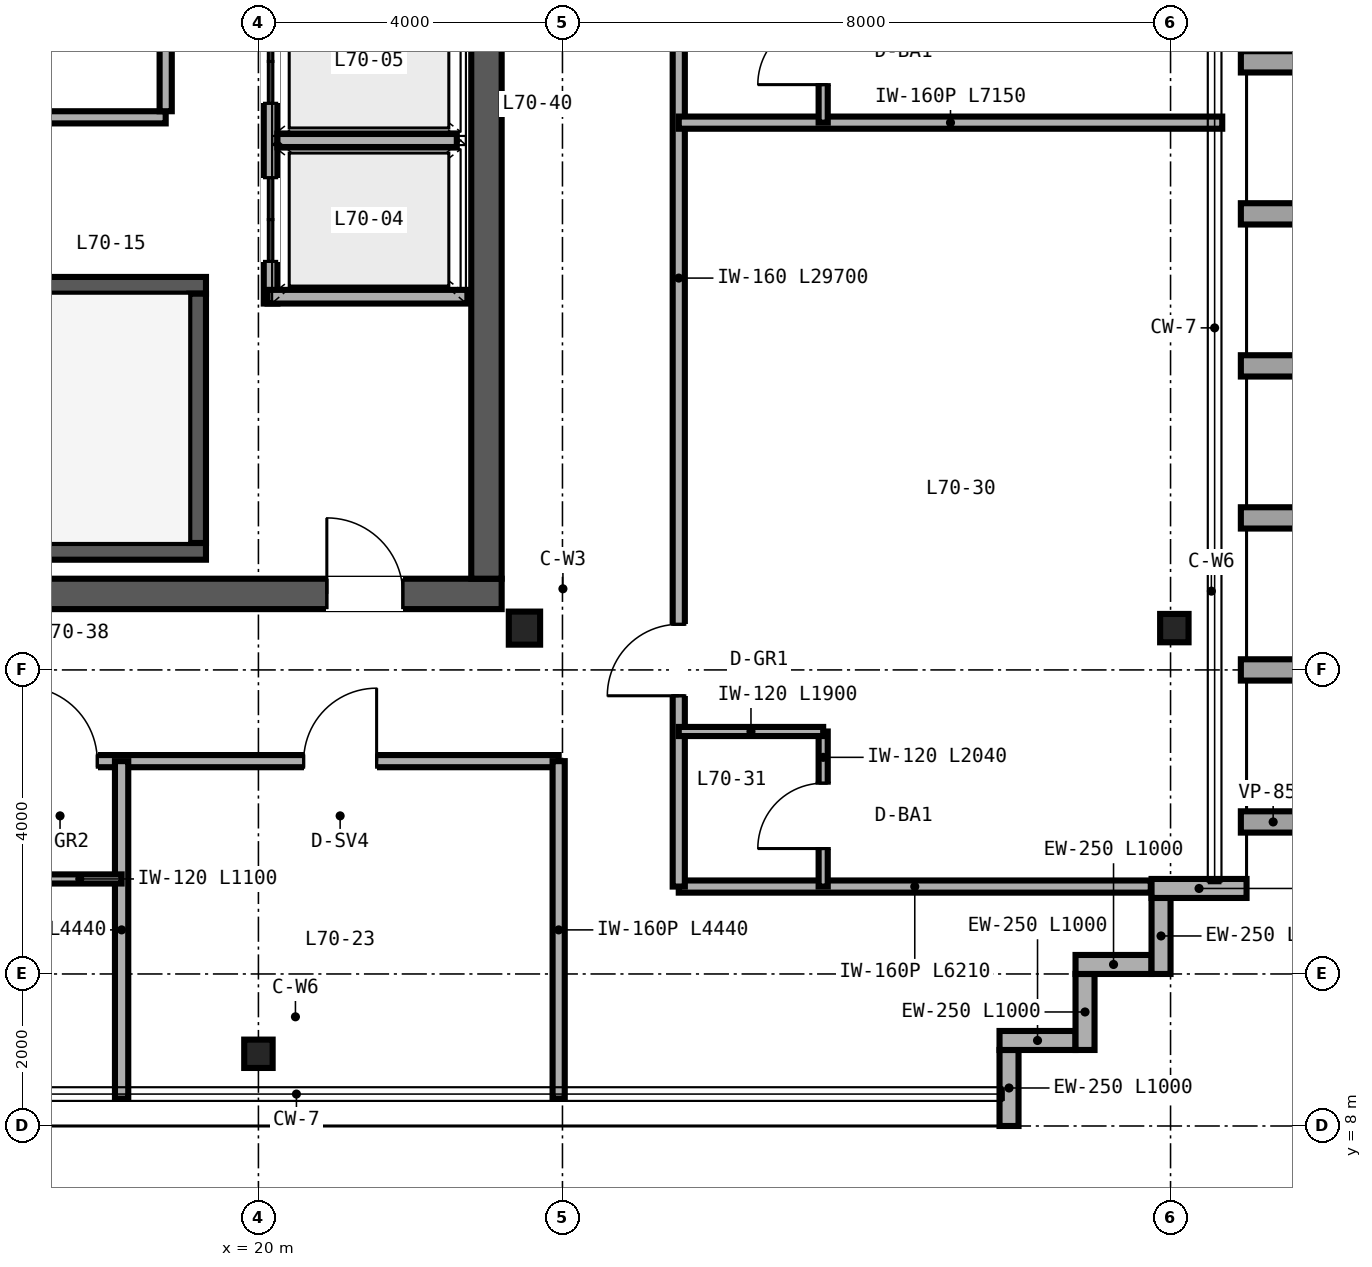
"""IFC4 building model, lengths in metres.
Left out: names, types, materials, properties, quantities, classifications, styles, units other than length and angle.
Written with IfcOpenShell. Run it as: python <this file> out.ifc"""

import sys

from ifc_helpers import new_model, si_unit, direction, frame, frame_2d, origin, origin_2d, place, context, subcontext, project, spatial, rectangle, i_section, extrude, source, transform, mapped, element, fill, save


model = new_model("IFC4")
c1 = context("Model", 3, precision=1e-05, world=origin(), true_north=direction((0.0, 1.0)))
c2 = subcontext(c1, "Body", "Model", "MODEL_VIEW")
j1 = project(units=[si_unit("LENGTHUNIT", "METRE"), si_unit("PLANEANGLEUNIT", "RADIAN")], contexts=[c1])
p1 = place(None, origin())
s1 = spatial("IfcSite", under=j1, at=p1, CompositionType="ELEMENT")
p2 = place(p1, origin())
s2 = spatial("IfcBuilding", under=s1, at=p2, CompositionType="ELEMENT")
p3 = place(p2, frame((0.0, 0.0, 276.0)))
s3 = spatial("IfcBuildingStorey", under=s2, at=p3, CompositionType="ELEMENT", Elevation=276.0)
p4 = place(p3, frame((10.8, 15.0, 0.0), z_axis=(0.0, 0.0, 1.0), x_axis=(1.0, 0.0, 0.0)))
e1 = element("IfcWall", 1, at=p4, inside=s3, PredefinedType="SHEAR", context=c2, shape_type="SweptSolid", body=[
    extrude(rectangle(XDim=12.4, YDim=0.4, at=frame_2d((6.2, 0.0))), origin(), (0.0, 0.0, 1.0), 3.38),
])
p5 = place(p4, frame((10.1, 0.0, 0.0)))
e2 = element("IfcOpeningElement", 2, at=p5, cuts=e1, PredefinedType="OPENING", context=c2, shape_type="SweptSolid", body=[
    extrude(rectangle(XDim=1.0, YDim=2.15, at=frame_2d((0.5, 1.075))), frame((0.0, 0.21, 0.0), z_axis=(0.0, -1.0, 0.0), x_axis=(1.0, 0.0, 0.0)), (0.0, 0.0, 1.0), 0.42),
])
p6 = place(p3, frame((23.0, 15.2, 0.0), z_axis=(0.0, 0.0, 1.0), x_axis=(0.0, 1.0, 0.0)))
e3 = element("IfcWall", 3, at=p6, inside=s3, PredefinedType="SHEAR", context=c2, shape_type="SweptSolid", body=[
    extrude(rectangle(XDim=21.6, YDim=0.4, at=frame_2d((10.8, 0.0))), origin(), (0.0, 0.0, 1.0), 3.38),
])
p7 = place(p3, frame((11.2, 15.56, 0.0), z_axis=(0.0, 0.0, 1.0), x_axis=(1.0, 0.0, 0.0)))
e4 = element("IfcWall", 4, at=p7, inside=s3, PredefinedType="SHEAR", context=c2, shape_type="SweptSolid", body=[
    extrude(rectangle(XDim=8.11, YDim=0.22, at=frame_2d((4.055, 0.0))), origin(), (0.0, 0.0, 1.0), 3.4),
])
p8 = place(p3, frame((11.2, 19.06, 0.0), z_axis=(0.0, 0.0, 1.0), x_axis=(1.0, 0.0, 0.0)))
e5 = element("IfcWall", 5, at=p8, inside=s3, PredefinedType="SHEAR", context=c2, shape_type="SweptSolid", body=[
    extrude(rectangle(XDim=8.11, YDim=0.22, at=frame_2d((4.055, 0.0))), origin(), (0.0, 0.0, 1.0), 3.4),
])
p9 = place(p8, frame((0.72, 0.0, 0.0)))
e6 = element("IfcOpeningElement", 6, at=p9, cuts=e5, PredefinedType="OPENING", context=c2, shape_type="SweptSolid", body=[
    extrude(rectangle(XDim=1.05, YDim=2.15, at=frame_2d((0.525, 1.075))), frame((0.0, 0.12, 0.0), z_axis=(0.0, -1.0, 0.0), x_axis=(1.0, 0.0, 0.0)), (0.0, 0.0, 1.0), 0.24),
])
p10 = place(p3, frame((19.2, 15.67, 0.0), z_axis=(0.0, 0.0, 1.0), x_axis=(0.0, 1.0, 0.0)))
e7 = element("IfcWall", 7, at=p10, inside=s3, PredefinedType="SHEAR", context=c2, shape_type="SweptSolid", body=[
    extrude(rectangle(XDim=3.28, YDim=0.22, at=frame_2d((1.64, 0.0))), origin(), (0.0, 0.0, 1.0), 3.4),
])
m1 = source(origin(), c2, "Body", "SweptSolid", [
    extrude(i_section(OverallWidth=0.412, OverallDepth=0.435, WebThickness=0.036, FlangeThickness=0.057, FilletRadius=0.025, at=origin_2d()), origin(), (0.0, 0.0, 1.0), 3.38),
])
p11 = place(p3, frame((23.5, 14.55, 0.0), z_axis=(0.0, 0.0, 1.0), x_axis=(1.0, 0.0, 0.0)))
e8 = element("IfcColumn", 8, at=p11, inside=s3, PredefinedType="COLUMN", context=c2, shape_type="MappedRepresentation", body=[
    mapped(m1, transform((0.0, 0.0, 0.0), scale=1.0)),
])
m2 = source(origin(), c2, "Body", "SweptSolid", [
    extrude(i_section(OverallWidth=0.374, OverallDepth=0.373, WebThickness=0.016, FlangeThickness=0.026, FilletRadius=0.025, at=origin_2d()), origin(), (0.0, 0.0, 1.0), 3.38),
])
for number, where, z_axis, x_axis in (
    (9, (20.0, 8.95, 0.0), (0.0, 0.0, 1.0), (1.0, 0.0, 0.0)),
    (10, (32.05, 14.55, 0.0), (0.0, 0.0, 1.0), (1.0, 0.0, 0.0)),
):
    element("IfcColumn", number, at=place(p3, frame(where, z_axis=z_axis, x_axis=x_axis)), inside=s3, PredefinedType="COLUMN", context=c2, shape_type="MappedRepresentation", body=[
        mapped(m2, transform((0.0, 0.0, 0.0), scale=1.0)),
    ])
for number, where, z_axis, x_axis in (
    (11, (29.875, 8.0, 0.0), (0.0, 0.0, 1.0), (0.0, 1.0, 0.0)),
    (12, (29.75, 9.125, 0.0), (0.0, 0.0, 1.0), (1.0, 0.0, 0.0)),
    (13, (30.875, 9.0, 0.0), (0.0, 0.0, 1.0), (0.0, 1.0, 0.0)),
    (14, (30.75, 10.125, 0.0), (0.0, 0.0, 1.0), (1.0, 0.0, 0.0)),
    (15, (31.875, 10.0, 0.0), (0.0, 0.0, 1.0), (0.0, 1.0, 0.0)),
):
    element("IfcWall", number, at=place(p3, frame(where, z_axis=z_axis, x_axis=x_axis)), inside=s3, PredefinedType="SOLIDWALL", context=c2, shape_type="SweptSolid", body=[
        extrude(rectangle(XDim=1.0, YDim=0.25, at=frame_2d((0.5, 0.0))), origin(), (0.0, 0.0, 1.0), 3.38),
    ])
p12 = place(p3, frame((31.75, 11.125, 0.0), z_axis=(0.0, 0.0, 1.0), x_axis=(1.0, 0.0, 0.0)))
e16 = element("IfcWall", 16, at=p12, inside=s3, PredefinedType="SOLIDWALL", context=c2, shape_type="SweptSolid", body=[
    extrude(rectangle(XDim=1.25, YDim=0.25, at=frame_2d((0.625, 0.0))), origin(), (0.0, 0.0, 1.0), 3.38),
])
p13 = place(p3, frame((20.16, 18.82, 0.0), z_axis=(0.0, 0.0, 1.0), x_axis=(0.0, 1.0, 0.0)))
e17 = element("IfcWall", 17, at=p13, inside=s3, PredefinedType="SOLIDWALL", context=c2, shape_type="SweptSolid", body=[
    extrude(rectangle(XDim=6.32, YDim=0.18, at=frame_2d((3.16, 0.0))), origin(), (0.0, 0.0, 1.0), 2.48),
])
p14 = place(p13, frame((0.555, 0.0, 0.0)))
e18 = element("IfcOpeningElement", 18, at=p14, cuts=e17, PredefinedType="OPENING", context=c2, shape_type="SweptSolid", body=[
    extrude(rectangle(XDim=1.1, YDim=2.2, at=frame_2d((0.55, 1.1))), frame((0.0, 0.1, 0.0), z_axis=(0.0, -1.0, 0.0), x_axis=(1.0, 0.0, 0.0)), (0.0, 0.0, 1.0), 0.2),
])
p15 = place(p13, frame((2.635, 0.0, 0.0)))
e19 = element("IfcOpeningElement", 19, at=p15, cuts=e17, PredefinedType="OPENING", context=c2, shape_type="SweptSolid", body=[
    extrude(rectangle(XDim=1.1, YDim=2.2, at=frame_2d((0.55, 1.1))), frame((0.0, 0.1, 0.0), z_axis=(0.0, -1.0, 0.0), x_axis=(1.0, 0.0, 0.0)), (0.0, 0.0, 1.0), 0.2),
])
p16 = place(p13, frame((4.69, 0.0, 0.0)))
e20 = element("IfcOpeningElement", 20, at=p16, cuts=e17, PredefinedType="OPENING", context=c2, shape_type="SweptSolid", body=[
    extrude(rectangle(XDim=1.1, YDim=2.2, at=frame_2d((0.55, 1.1))), frame((0.0, 0.1, 0.0), z_axis=(0.0, -1.0, 0.0), x_axis=(1.0, 0.0, 0.0)), (0.0, 0.0, 1.0), 0.2),
])
p17 = place(p3, frame((20.12, 18.91, 0.0), z_axis=(0.0, 0.0, 1.0), x_axis=(1.0, 0.0, 0.0)))
e21 = element("IfcWall", 21, at=p17, inside=s3, PredefinedType="SOLIDWALL", context=c2, shape_type="SweptSolid", body=[
    extrude(rectangle(XDim=2.63, YDim=0.18, at=frame_2d((1.315, 0.0))), origin(), (0.0, 0.0, 1.0), 3.38),
])
p18 = place(p3, frame((20.25, 20.965, 0.0), z_axis=(0.0, 0.0, 1.0), x_axis=(1.0, 0.0, 0.0)))
e22 = element("IfcWall", 22, at=p18, inside=s3, PredefinedType="SOLIDWALL", context=c2, shape_type="SweptSolid", body=[
    extrude(rectangle(XDim=2.36, YDim=0.18, at=frame_2d((1.18, 0.0))), origin(), (0.0, 0.0, 1.0), 2.48),
])
p19 = place(p3, frame((14.2, 21.27, 0.0), z_axis=(0.0, 0.0, 1.0), x_axis=(1.0, 0.0, 0.0)))
e23 = element("IfcWall", 23, at=p19, inside=s3, PredefinedType="PARTITIONING", context=c2, shape_type="SweptSolid", body=[
    extrude(rectangle(XDim=4.58, YDim=0.16, at=frame_2d((2.29, 0.0))), origin(), (0.0, 0.0, 1.0), 3.38),
])
p20 = place(p19, frame((1.8, 0.0, 0.0)))
e24 = element("IfcOpeningElement", 24, at=p20, cuts=e23, PredefinedType="OPENING", context=c2, shape_type="SweptSolid", body=[
    extrude(rectangle(XDim=1.0, YDim=2.15, at=frame_2d((0.5, 1.075))), frame((0.0, 0.09, 0.0), z_axis=(0.0, -1.0, 0.0), x_axis=(1.0, 0.0, 0.0)), (0.0, 0.0, 1.0), 0.18),
])
p21 = place(p3, frame((18.78, 21.35, 0.0), z_axis=(0.0, 0.0, 1.0), x_axis=(0.0, 1.0, 0.0)))
e25 = element("IfcWall", 25, at=p21, inside=s3, PredefinedType="PARTITIONING", context=c2, shape_type="SweptSolid", body=[
    extrude(rectangle(XDim=3.81, YDim=0.16, at=frame_2d((1.905, 0.0))), origin(), (0.0, 0.0, 1.0), 3.38),
])
p22 = place(p3, frame((11.2, 12.8, 0.0), z_axis=(0.0, 0.0, 1.0), x_axis=(1.0, 0.0, 0.0)))
e26 = element("IfcWall", 26, at=p22, inside=s3, PredefinedType="PARTITIONING", context=c2, shape_type="SweptSolid", body=[
    extrude(rectangle(XDim=12.75, YDim=0.16, at=frame_2d((6.375, 0.0))), origin(), (0.0, 0.0, 1.0), 3.38),
])
p23 = place(p22, frame((5.7, 0.0, 0.0)))
e27 = element("IfcOpeningElement", 27, at=p23, cuts=e26, PredefinedType="OPENING", context=c2, shape_type="SweptSolid", body=[
    extrude(rectangle(XDim=0.98, YDim=2.2, at=frame_2d((0.49, 1.1))), frame((0.0, 0.09, 0.0), z_axis=(0.0, -1.0, 0.0), x_axis=(1.0, 0.0, 0.0)), (0.0, 0.0, 1.0), 0.18),
])
p24 = place(p22, frame((9.395, 0.0, 0.0)))
e28 = element("IfcOpeningElement", 28, at=p24, cuts=e26, PredefinedType="OPENING", context=c2, shape_type="SweptSolid", body=[
    extrude(rectangle(XDim=0.96, YDim=2.15, at=frame_2d((0.48, 1.075))), frame((0.0, 0.09, 0.0), z_axis=(0.0, -1.0, 0.0), x_axis=(1.0, 0.0, 0.0)), (0.0, 0.0, 1.0), 0.18),
])
p25 = place(p3, frame((23.95, 8.36, 0.0), z_axis=(0.0, 0.0, 1.0), x_axis=(0.0, 1.0, 0.0)))
e29 = element("IfcWall", 29, at=p25, inside=s3, PredefinedType="PARTITIONING", context=c2, shape_type="SweptSolid", body=[
    extrude(rectangle(XDim=4.44, YDim=0.16, at=frame_2d((2.22, 0.0))), origin(), (0.0, 0.0, 1.0), 3.38),
])
p26 = place(p3, frame((18.2, 8.36, 0.0), z_axis=(0.0, 0.0, 1.0), x_axis=(0.0, 1.0, 0.0)))
e30 = element("IfcWall", 30, at=p26, inside=s3, PredefinedType="PARTITIONING", context=c2, shape_type="SweptSolid", body=[
    extrude(rectangle(XDim=4.44, YDim=0.175, at=frame_2d((2.22, 0.0))), origin(), (0.0, 0.0, 1.0), 2.687),
])
p27 = place(p3, frame((17.1, 11.25, 0.0), z_axis=(0.0, 0.0, 1.0), x_axis=(1.0, 0.0, 0.0)))
e31 = element("IfcWall", 31, at=p27, inside=s3, PredefinedType="PARTITIONING", context=c2, shape_type="SweptSolid", body=[
    extrude(rectangle(XDim=1.1, YDim=0.12, at=frame_2d((0.55, 0.0))), origin(), (0.0, 0.0, 1.0), 3.38),
])
p28 = place(p3, frame((25.53, 11.15, 0.0), z_axis=(0.0, 0.0, 1.0), x_axis=(1.0, 0.0, 0.0)))
e32 = element("IfcWall", 32, at=p28, inside=s3, PredefinedType="PARTITIONING", context=c2, shape_type="SweptSolid", body=[
    extrude(rectangle(XDim=6.21, YDim=0.16, at=frame_2d((3.105, 0.0))), origin(), (0.0, 0.0, 1.0), 3.38),
])
p29 = place(p3, frame((25.53, 11.15, 0.0), z_axis=(0.0, 0.0, 1.0), x_axis=(0.0, 1.0, 0.0)))
e33 = element("IfcWall", 33, at=p29, inside=s3, PredefinedType="PARTITIONING", context=c2, shape_type="SweptSolid", body=[
    extrude(rectangle(XDim=29.7, YDim=0.16, at=frame_2d((14.85, 0.0))), origin(), (0.0, 0.0, 1.0), 2.524),
])
p30 = place(p29, frame((2.51, 0.0, 0.0)))
e34 = element("IfcOpeningElement", 34, at=p30, cuts=e33, PredefinedType="OPENING", context=c2, shape_type="SweptSolid", body=[
    extrude(rectangle(XDim=0.94, YDim=2.15, at=frame_2d((0.47, 1.075))), frame((0.0, 0.09, 0.0), z_axis=(0.0, -1.0, 0.0), x_axis=(1.0, 0.0, 0.0)), (0.0, 0.0, 1.0), 0.18),
])
p31 = place(p29, frame((12.56, 0.0, 0.0)))
e35 = element("IfcOpeningElement", 35, at=p31, cuts=e33, PredefinedType="OPENING", context=c2, shape_type="SweptSolid", body=[
    extrude(rectangle(XDim=0.94, YDim=2.15, at=frame_2d((0.47, 1.075))), frame((0.0, 0.09, 0.0), z_axis=(0.0, -1.0, 0.0), x_axis=(1.0, 0.0, 0.0)), (0.0, 0.0, 1.0), 0.18),
])
p32 = place(p29, frame((22.16, 0.0, 0.0)))
e36 = element("IfcOpeningElement", 36, at=p32, cuts=e33, PredefinedType="OPENING", context=c2, shape_type="SweptSolid", body=[
    extrude(rectangle(XDim=0.94, YDim=2.15, at=frame_2d((0.47, 1.075))), frame((0.0, 0.09, 0.0), z_axis=(0.0, -1.0, 0.0), x_axis=(1.0, 0.0, 0.0)), (0.0, 0.0, 1.0), 0.18),
])
p33 = place(p3, frame((25.53, 21.2, 0.0), z_axis=(0.0, 0.0, 1.0), x_axis=(1.0, 0.0, 0.0)))
e37 = element("IfcWall", 37, at=p33, inside=s3, PredefinedType="PARTITIONING", context=c2, shape_type="SweptSolid", body=[
    extrude(rectangle(XDim=7.15, YDim=0.16, at=frame_2d((3.575, 0.0))), origin(), (0.0, 0.0, 1.0), 2.601),
])
p34 = place(p3, frame((27.43, 11.15, 0.0), z_axis=(0.0, 0.0, 1.0), x_axis=(0.0, 1.0, 0.0)))
e38 = element("IfcWall", 38, at=p34, inside=s3, PredefinedType="PARTITIONING", context=c2, shape_type="SweptSolid", body=[
    extrude(rectangle(XDim=2.04, YDim=0.12, at=frame_2d((1.02, 0.0))), origin(), (0.0, 0.0, 1.0), 3.38),
])
p35 = place(p34, frame((0.5, 0.0, 0.0)))
e39 = element("IfcOpeningElement", 39, at=p35, cuts=e38, PredefinedType="OPENING", context=c2, shape_type="SweptSolid", body=[
    extrude(rectangle(XDim=0.86, YDim=2.1, at=frame_2d((0.43, 1.05))), frame((0.0, 0.07, 0.0), z_axis=(0.0, -1.0, 0.0), x_axis=(1.0, 0.0, 0.0)), (0.0, 0.0, 1.0), 0.14),
])
p36 = place(p3, frame((25.53, 13.19, 0.0), z_axis=(0.0, 0.0, 1.0), x_axis=(1.0, 0.0, 0.0)))
e40 = element("IfcWall", 40, at=p36, inside=s3, PredefinedType="PARTITIONING", context=c2, shape_type="SweptSolid", body=[
    extrude(rectangle(XDim=1.9, YDim=0.12, at=frame_2d((0.95, 0.0))), origin(), (0.0, 0.0, 1.0), 3.38),
])
p37 = place(p3, frame((27.43, 21.2, 0.0), z_axis=(0.0, 0.0, 1.0), x_axis=(0.0, 1.0, 0.0)))
e41 = element("IfcWall", 41, at=p37, inside=s3, PredefinedType="PARTITIONING", context=c2, shape_type="SweptSolid", body=[
    extrude(rectangle(XDim=2.04, YDim=0.12, at=frame_2d((1.02, 0.0))), origin(), (0.0, 0.0, 1.0), 3.38),
])
p38 = place(p37, frame((0.5, 0.0, 0.0)))
e42 = element("IfcOpeningElement", 42, at=p38, cuts=e41, PredefinedType="OPENING", context=c2, shape_type="SweptSolid", body=[
    extrude(rectangle(XDim=0.86, YDim=2.1, at=frame_2d((0.43, 1.05))), frame((0.0, 0.07, 0.0), z_axis=(0.0, -1.0, 0.0), x_axis=(1.0, 0.0, 0.0)), (0.0, 0.0, 1.0), 0.14),
])
m3 = source(origin(), c2, "Body", "SweptSolid", [
    extrude(rectangle(XDim=1.1, YDim=2.2, at=frame_2d((0.55, 1.1))), frame((0.0, 0.025, 0.0), z_axis=(0.0, -1.0, 0.0), x_axis=(1.0, 0.0, 0.0)), (0.0, 0.0, 1.0), 0.05),
])
p39 = place(p14, origin())
e43 = element("IfcDoor", 43, at=p39, inside=s3, OperationType="DOUBLE_DOOR_SLIDING", PredefinedType="DOOR", context=c2, shape_type="MappedRepresentation", body=[
    mapped(m3, transform((0.0, 0.0, 0.0), scale=1.0)),
])
fill(e18, e43)
p40 = place(p15, origin())
e44 = element("IfcDoor", 44, at=p40, inside=s3, OperationType="DOUBLE_DOOR_SLIDING", PredefinedType="DOOR", context=c2, shape_type="MappedRepresentation", body=[
    mapped(m3, transform((0.0, 0.0, 0.0), scale=1.0)),
])
fill(e19, e44)
m4 = source(origin(), c2, "Body", "SweptSolid", [
    extrude(rectangle(XDim=1.0, YDim=2.15, at=frame_2d((0.5, 1.075))), frame((0.0, 0.025, 0.0), z_axis=(0.0, -1.0, 0.0), x_axis=(1.0, 0.0, 0.0)), (0.0, 0.0, 1.0), 0.05),
])
p41 = place(p5, origin())
e45 = element("IfcDoor", 45, at=p41, inside=s3, OperationType="SINGLE_SWING_LEFT", PredefinedType="DOOR", context=c2, shape_type="MappedRepresentation", body=[
    mapped(m4, transform((0.0, 0.0, 0.0), scale=1.0)),
])
fill(e2, e45)
m5 = source(origin(), c2, "Body", "SweptSolid", [
    extrude(rectangle(XDim=0.98, YDim=2.2, at=frame_2d((0.49, 1.1))), frame((0.0, 0.025, 0.0), z_axis=(0.0, -1.0, 0.0), x_axis=(1.0, 0.0, 0.0)), (0.0, 0.0, 1.0), 0.05),
])
p42 = place(p23, origin())
e46 = element("IfcDoor", 46, at=p42, inside=s3, OperationType="SINGLE_SWING_LEFT", PredefinedType="DOOR", context=c2, shape_type="MappedRepresentation", body=[
    mapped(m5, transform((0.0, 0.0, 0.0), scale=1.0)),
])
fill(e27, e46)
m6 = source(origin(), c2, "Body", "SweptSolid", [
    extrude(rectangle(XDim=0.96, YDim=2.15, at=frame_2d((0.48, 1.075))), frame((0.0, 0.025, 0.0), z_axis=(0.0, -1.0, 0.0), x_axis=(1.0, 0.0, 0.0)), (0.0, 0.0, 1.0), 0.05),
])
p43 = place(p24, origin())
e47 = element("IfcDoor", 47, at=p43, inside=s3, OperationType="SINGLE_SWING_RIGHT", PredefinedType="DOOR", context=c2, shape_type="MappedRepresentation", body=[
    mapped(m6, transform((0.0, 0.0, 0.0), scale=1.0)),
])
fill(e28, e47)
m7 = source(origin(), c2, "Body", "SweptSolid", [
    extrude(rectangle(XDim=0.86, YDim=2.1, at=frame_2d((0.43, 1.05))), frame((0.0, 0.025, 0.0), z_axis=(0.0, -1.0, 0.0), x_axis=(1.0, 0.0, 0.0)), (0.0, 0.0, 1.0), 0.05),
])
p44 = place(p35, origin())
e48 = element("IfcDoor", 48, at=p44, inside=s3, OperationType="SINGLE_SWING_LEFT", PredefinedType="DOOR", context=c2, shape_type="MappedRepresentation", body=[
    mapped(m7, transform((0.0, 0.0, 0.0), scale=1.0)),
])
fill(e39, e48)
m8 = source(origin(), c2, "Body", "SweptSolid", [
    extrude(rectangle(XDim=0.94, YDim=2.15, at=frame_2d((0.47, 1.075))), frame((0.0, 0.025, 0.0), z_axis=(0.0, -1.0, 0.0), x_axis=(1.0, 0.0, 0.0)), (0.0, 0.0, 1.0), 0.05),
])
p45 = place(p30, origin())
e49 = element("IfcDoor", 49, at=p45, inside=s3, OperationType="SINGLE_SWING_LEFT", PredefinedType="DOOR", context=c2, shape_type="MappedRepresentation", body=[
    mapped(m8, transform((0.0, 0.0, 0.0), scale=1.0)),
])
fill(e34, e49)
p46 = place(p38, origin())
e50 = element("IfcDoor", 50, at=p46, inside=s3, OperationType="SINGLE_SWING_LEFT", PredefinedType="DOOR", context=c2, shape_type="MappedRepresentation", body=[
    mapped(m7, transform((0.0, 0.0, 0.0), scale=1.0)),
])
fill(e42, e50)
save(model, sys.argv[1])
